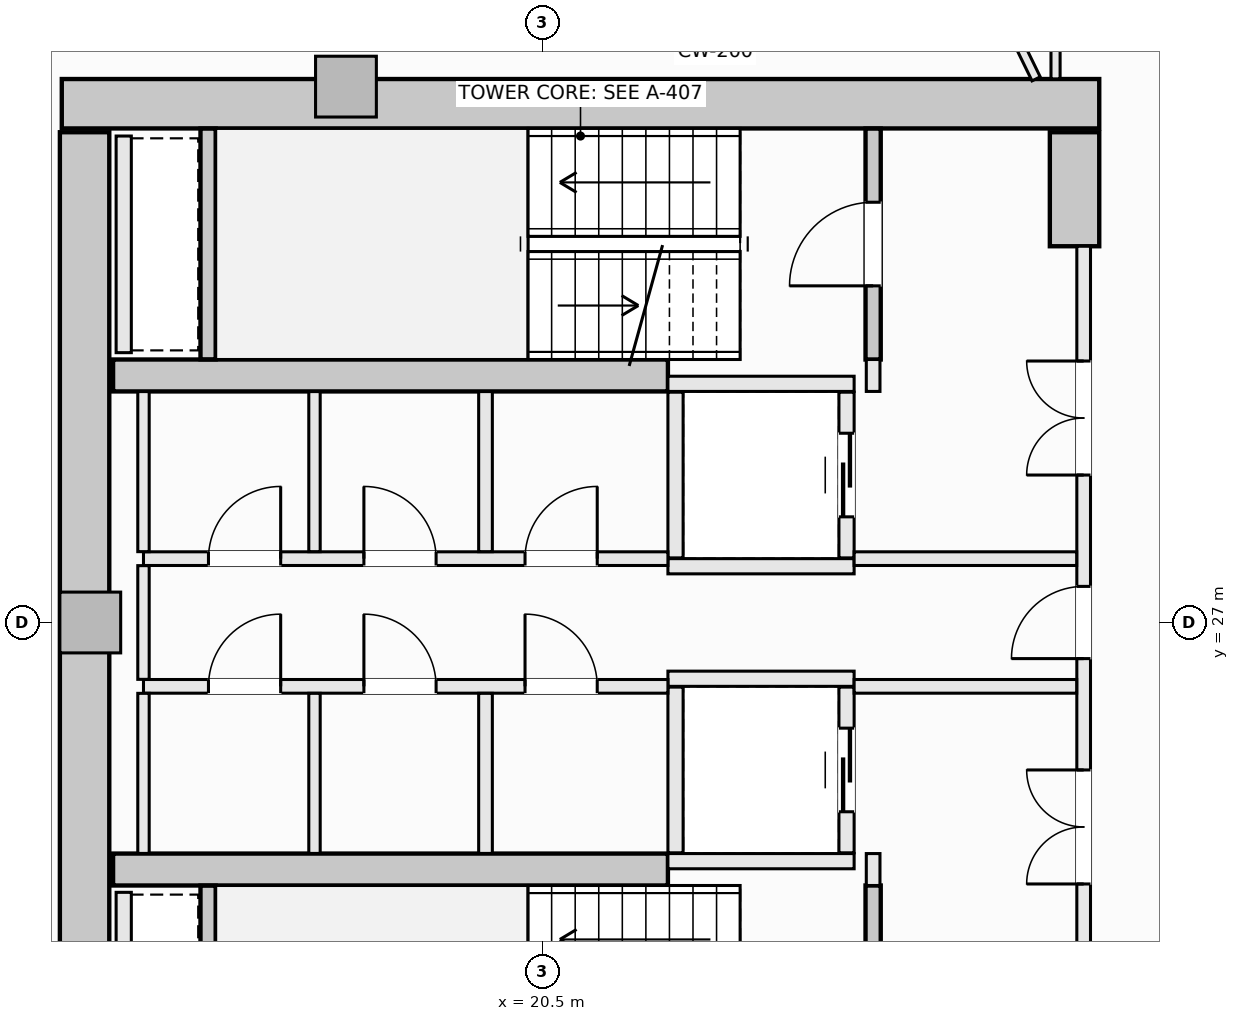
"""IFC4 building model, lengths in metres.
Left out: names, types, materials, properties, quantities, classifications, styles, units other than length and angle.
Written with IfcOpenShell. Run it as: python <this file> out.ifc"""

import sys

from ifc_helpers import new_model, si_unit, direction, frame, frame_2d, origin, origin_2d, place, context, subcontext, project, spatial, rectangle, extrude, element, fill, save


model = new_model("IFC4")
c1 = context("Model", 3, precision=1e-05, world=origin(), true_north=direction((0.0, 1.0)))
c2 = subcontext(c1, "Body", "Model", "MODEL_VIEW")
j1 = project(units=[si_unit("LENGTHUNIT", "METRE"), si_unit("PLANEANGLEUNIT", "RADIAN")], contexts=[c1])
p1 = place(None, origin())
s1 = spatial("IfcSite", under=j1, at=p1, CompositionType="ELEMENT")
p2 = place(p1, origin())
s2 = spatial("IfcBuilding", under=s1, at=p2, CompositionType="ELEMENT")
p3 = place(p2, frame((0.0, 0.0, 125.7)))
s3 = spatial("IfcBuildingStorey", under=s2, at=p3, CompositionType="ELEMENT", Elevation=125.7)
p4 = place(p3, frame((14.175, 33.825, -0.27), z_axis=(0.0, 0.0, 1.0), x_axis=(1.0, 0.0, 0.0)))
e1 = element("IfcWall", 1, at=p4, inside=s3, PredefinedType="SHEAR", context=c2, shape_type="SweptSolid", body=[
    extrude(rectangle(XDim=13.65, YDim=0.65, at=frame_2d((6.825, 0.0))), origin(), (0.0, 0.0, 1.0), 3.4),
])
p5 = place(p3, frame((14.475, 20.55, -0.27), z_axis=(0.0, 0.0, 1.0), x_axis=(0.0, 1.0, 0.0)))
e2 = element("IfcWall", 2, at=p5, inside=s3, PredefinedType="SHEAR", context=c2, shape_type="SweptSolid", body=[
    extrude(rectangle(XDim=12.9, YDim=0.65, at=frame_2d((6.45, 0.0))), origin(), (0.0, 0.0, 1.0), 3.4),
])
p6 = place(p3, frame((27.5, 31.95, -0.27), z_axis=(0.0, 0.0, 1.0), x_axis=(0.0, 1.0, 0.0)))
e3 = element("IfcWall", 3, at=p6, inside=s3, PredefinedType="SHEAR", context=c2, shape_type="SweptSolid", body=[
    extrude(rectangle(XDim=1.5, YDim=0.65, at=frame_2d((0.75, 0.0))), origin(), (0.0, 0.0, 1.0), 3.4),
])
for number, where, z_axis, x_axis in (
    (4, (14.85, 30.25, -0.27), (0.0, 0.0, 1.0), (1.0, 0.0, 0.0)),
    (5, (14.85, 23.75, -0.27), (0.0, 0.0, 1.0), (1.0, 0.0, 0.0)),
):
    element("IfcWall", number, at=place(p3, frame(where, z_axis=z_axis, x_axis=x_axis)), inside=s3, PredefinedType="SHEAR", context=c2, shape_type="SweptSolid", body=[
        extrude(rectangle(XDim=7.3, YDim=0.42, at=frame_2d((3.65, 0.0))), origin(), (0.0, 0.0, 1.0), 3.4),
    ])
for number, where, z_axis, x_axis in (
    (6, (17.914, 34.05, -0.27), (0.0, 0.0, 1.0), (1.0, 0.0, 0.0)),
    (7, (14.55, 27.0, -0.27), (0.0, 0.0, 1.0), (1.0, 0.0, 0.0)),
):
    element("IfcColumn", number, at=place(p3, frame(where, z_axis=z_axis, x_axis=x_axis)), inside=s3, PredefinedType="PILASTER", context=c2, shape_type="SweptSolid", body=[
        extrude(rectangle(XDim=0.8, YDim=0.8, at=origin_2d()), origin(), (0.0, 0.0, 1.0), 3.4),
    ])
p7 = place(p3, frame((24.85, 30.46, -0.27), z_axis=(0.0, 0.0, 1.0), x_axis=(0.0, 1.0, 0.0)))
e8 = element("IfcWall", 8, at=p7, inside=s3, PredefinedType="SHEAR", context=c2, shape_type="SweptSolid", body=[
    extrude(rectangle(XDim=3.038, YDim=0.2, at=frame_2d((1.519, 0.0))), origin(), (0.0, 0.0, 1.0), 3.4),
])
p8 = place(p7, frame((0.969, 0.0, 0.27)))
e9 = element("IfcOpeningElement", 9, at=p8, cuts=e8, PredefinedType="OPENING", context=c2, shape_type="SweptSolid", body=[
    extrude(rectangle(XDim=1.1, YDim=2.15, at=frame_2d((0.55, 1.075))), frame((0.0, 0.11, 0.0), z_axis=(0.0, -1.0, 0.0), x_axis=(1.0, 0.0, 0.0)), (0.0, 0.0, 1.0), 0.22),
])
p9 = place(p3, frame((16.1, 30.462, -0.27), z_axis=(0.0, 0.0, 1.0), x_axis=(0.0, 1.0, 0.0)))
e10 = element("IfcWall", 10, at=p9, inside=s3, PredefinedType="SHEAR", context=c2, shape_type="SweptSolid", body=[
    extrude(rectangle(XDim=3.036, YDim=0.2, at=frame_2d((1.518, 0.0))), origin(), (0.0, 0.0, 1.0), 3.4),
])
p10 = place(p3, frame((24.85, 20.502, -0.27), z_axis=(0.0, 0.0, 1.0), x_axis=(0.0, 1.0, 0.0)))
e11 = element("IfcWall", 11, at=p10, inside=s3, PredefinedType="SHEAR", context=c2, shape_type="SweptSolid", body=[
    extrude(rectangle(XDim=3.038, YDim=0.2, at=frame_2d((1.519, 0.0))), origin(), (0.0, 0.0, 1.0), 3.4),
])
p11 = place(p10, frame((0.969, 0.0, 0.27)))
e12 = element("IfcOpeningElement", 12, at=p11, cuts=e11, PredefinedType="OPENING", context=c2, shape_type="SweptSolid", body=[
    extrude(rectangle(XDim=1.1, YDim=2.15, at=frame_2d((0.55, 1.075))), frame((0.0, 0.11, 0.0), z_axis=(0.0, -1.0, 0.0), x_axis=(1.0, 0.0, 0.0)), (0.0, 0.0, 1.0), 0.22),
])
p12 = place(p3, frame((16.1, 20.502, -0.27), z_axis=(0.0, 0.0, 1.0), x_axis=(0.0, 1.0, 0.0)))
e13 = element("IfcWall", 13, at=p12, inside=s3, PredefinedType="SHEAR", context=c2, shape_type="SweptSolid", body=[
    extrude(rectangle(XDim=3.036, YDim=0.2, at=frame_2d((1.518, 0.0))), origin(), (0.0, 0.0, 1.0), 3.4),
])
for number, where, z_axis, x_axis in (
    (14, (22.15, 30.14, 0.0), (0.0, 0.0, 1.0), (1.0, 0.0, 0.0)),
    (15, (22.15, 27.74, 0.0), (0.0, 0.0, 1.0), (1.0, 0.0, 0.0)),
):
    element("IfcWall", number, at=place(p3, frame(where, z_axis=z_axis, x_axis=x_axis)), inside=s3, PredefinedType="SOLIDWALL", context=c2, shape_type="SweptSolid", body=[
        extrude(rectangle(XDim=2.45, YDim=0.2, at=frame_2d((1.225, 0.0))), origin(), (0.0, 0.0, 1.0), 3.13),
    ])
p13 = place(p3, frame((22.25, 27.85, 0.0), z_axis=(0.0, 0.0, 1.0), x_axis=(0.0, 1.0, 0.0)))
e16 = element("IfcWall", 16, at=p13, inside=s3, PredefinedType="SOLIDWALL", context=c2, shape_type="SweptSolid", body=[
    extrude(rectangle(XDim=2.18, YDim=0.2, at=frame_2d((1.09, 0.0))), origin(), (0.0, 0.0, 1.0), 3.13),
])
p14 = place(p3, frame((24.5, 27.85, 0.0), z_axis=(0.0, 0.0, 1.0), x_axis=(0.0, 1.0, 0.0)))
e17 = element("IfcWall", 17, at=p14, inside=s3, PredefinedType="SOLIDWALL", context=c2, shape_type="SweptSolid", body=[
    extrude(rectangle(XDim=2.18, YDim=0.2, at=frame_2d((1.09, 0.0))), origin(), (0.0, 0.0, 1.0), 3.13),
])
p15 = place(p14, frame((0.54, 0.0, 0.0)))
e18 = element("IfcOpeningElement", 18, at=p15, cuts=e17, PredefinedType="OPENING", context=c2, shape_type="SweptSolid", body=[
    extrude(rectangle(XDim=1.1, YDim=2.2, at=frame_2d((0.55, 1.1))), frame((0.0, 0.11, 0.0), z_axis=(0.0, -1.0, 0.0), x_axis=(1.0, 0.0, 0.0)), (0.0, 0.0, 1.0), 0.22),
])
for number, where, z_axis, x_axis in (
    (19, (22.15, 26.26, 0.0), (0.0, 0.0, 1.0), (1.0, 0.0, 0.0)),
    (20, (22.15, 23.86, 0.0), (0.0, 0.0, 1.0), (1.0, 0.0, 0.0)),
):
    element("IfcWall", number, at=place(p3, frame(where, z_axis=z_axis, x_axis=x_axis)), inside=s3, PredefinedType="SOLIDWALL", context=c2, shape_type="SweptSolid", body=[
        extrude(rectangle(XDim=2.45, YDim=0.2, at=frame_2d((1.225, 0.0))), origin(), (0.0, 0.0, 1.0), 3.13),
    ])
p16 = place(p3, frame((22.25, 23.97, 0.0), z_axis=(0.0, 0.0, 1.0), x_axis=(0.0, 1.0, 0.0)))
e21 = element("IfcWall", 21, at=p16, inside=s3, PredefinedType="SOLIDWALL", context=c2, shape_type="SweptSolid", body=[
    extrude(rectangle(XDim=2.18, YDim=0.2, at=frame_2d((1.09, 0.0))), origin(), (0.0, 0.0, 1.0), 3.13),
])
p17 = place(p3, frame((24.5, 23.97, 0.0), z_axis=(0.0, 0.0, 1.0), x_axis=(0.0, 1.0, 0.0)))
e22 = element("IfcWall", 22, at=p17, inside=s3, PredefinedType="SOLIDWALL", context=c2, shape_type="SweptSolid", body=[
    extrude(rectangle(XDim=2.18, YDim=0.2, at=frame_2d((1.09, 0.0))), origin(), (0.0, 0.0, 1.0), 3.13),
])
p18 = place(p17, frame((0.54, 0.0, 0.0)))
e23 = element("IfcOpeningElement", 23, at=p18, cuts=e22, PredefinedType="OPENING", context=c2, shape_type="SweptSolid", body=[
    extrude(rectangle(XDim=1.1, YDim=2.2, at=frame_2d((0.55, 1.1))), frame((0.0, 0.11, 0.0), z_axis=(0.0, -1.0, 0.0), x_axis=(1.0, 0.0, 0.0)), (0.0, 0.0, 1.0), 0.22),
])
for number, where, z_axis, x_axis in (
    (24, (14.99, 30.55, 0.0), (0.0, 0.0, 1.0), (0.0, 1.0, 0.0)),
    (25, (14.99, 20.6, 0.0), (0.0, 0.0, 1.0), (0.0, 1.0, 0.0)),
):
    element("IfcWall", number, at=place(p3, frame(where, z_axis=z_axis, x_axis=x_axis)), inside=s3, PredefinedType="SOLIDWALL", context=c2, shape_type="SweptSolid", body=[
        extrude(rectangle(XDim=2.85, YDim=0.2, at=frame_2d((1.425, 0.0))), origin(), (0.0, 0.0, 1.0), 3.13),
    ])
for number, where, z_axis, x_axis in (
    (26, (24.85, 23.54, 0.0), (0.0, 0.0, 1.0), (0.0, 1.0, 0.0)),
    (27, (24.85, 30.04, 0.0), (0.0, 0.0, 1.0), (0.0, 1.0, 0.0)),
):
    element("IfcWall", number, at=place(p3, frame(where, z_axis=z_axis, x_axis=x_axis)), inside=s3, PredefinedType="SOLIDWALL", context=c2, shape_type="SweptSolid", body=[
        extrude(rectangle(XDim=0.42, YDim=0.18, at=frame_2d((0.21, 0.0))), origin(), (0.0, 0.0, 1.0), 3.13),
    ])
p19 = place(p3, frame((27.62, 22.05, 0.0), z_axis=(0.0, 0.0, 1.0), x_axis=(0.0, 1.0, 0.0)))
e28 = element("IfcWall", 28, at=p19, inside=s3, PredefinedType="SOLIDWALL", context=c2, shape_type="SweptSolid", body=[
    extrude(rectangle(XDim=9.9, YDim=0.18, at=frame_2d((4.95, 0.0))), origin(), (0.0, 0.0, 1.0), 3.13),
])
p20 = place(p19, frame((4.475, 0.0, 0.0)))
e29 = element("IfcOpeningElement", 29, at=p20, cuts=e28, PredefinedType="OPENING", context=c2, shape_type="SweptSolid", body=[
    extrude(rectangle(XDim=0.95, YDim=2.1, at=frame_2d((0.475, 1.05))), frame((0.0, 0.1, 0.0), z_axis=(0.0, -1.0, 0.0), x_axis=(1.0, 0.0, 0.0)), (0.0, 0.0, 1.0), 0.2),
])
p21 = place(p19, frame((6.89, 0.0, 0.0)))
e30 = element("IfcOpeningElement", 30, at=p21, cuts=e28, PredefinedType="OPENING", context=c2, shape_type="SweptSolid", body=[
    extrude(rectangle(XDim=1.5, YDim=2.2, at=frame_2d((0.75, 1.1))), frame((0.0, 0.1, 0.0), z_axis=(0.0, -1.0, 0.0), x_axis=(1.0, 0.0, 0.0)), (0.0, 0.0, 1.0), 0.2),
])
p22 = place(p19, frame((1.51, 0.0, 0.0)))
e31 = element("IfcOpeningElement", 31, at=p22, cuts=e28, PredefinedType="OPENING", context=c2, shape_type="SweptSolid", body=[
    extrude(rectangle(XDim=1.5, YDim=2.2, at=frame_2d((0.75, 1.1))), frame((0.0, 0.1, 0.0), z_axis=(0.0, -1.0, 0.0), x_axis=(1.0, 0.0, 0.0)), (0.0, 0.0, 1.0), 0.2),
])
p23 = place(p3, frame((15.25, 27.84, 0.0), z_axis=(0.0, 0.0, 1.0), x_axis=(1.0, 0.0, 0.0)))
e32 = element("IfcWall", 32, at=p23, inside=s3, PredefinedType="SOLIDWALL", context=c2, shape_type="SweptSolid", body=[
    extrude(rectangle(XDim=6.9, YDim=0.18, at=frame_2d((3.45, 0.0))), origin(), (0.0, 0.0, 1.0), 3.13),
])
p24 = place(p23, frame((5.02, 0.0, 0.0)))
e33 = element("IfcOpeningElement", 33, at=p24, cuts=e32, PredefinedType="OPENING", context=c2, shape_type="SweptSolid", body=[
    extrude(rectangle(XDim=0.95, YDim=2.1, at=frame_2d((0.475, 1.05))), frame((0.0, 0.1, 0.0), z_axis=(0.0, -1.0, 0.0), x_axis=(1.0, 0.0, 0.0)), (0.0, 0.0, 1.0), 0.2),
])
p25 = place(p23, frame((0.855, 0.0, 0.0)))
e34 = element("IfcOpeningElement", 34, at=p25, cuts=e32, PredefinedType="OPENING", context=c2, shape_type="SweptSolid", body=[
    extrude(rectangle(XDim=0.95, YDim=2.1, at=frame_2d((0.475, 1.05))), frame((0.0, 0.1, 0.0), z_axis=(0.0, -1.0, 0.0), x_axis=(1.0, 0.0, 0.0)), (0.0, 0.0, 1.0), 0.2),
])
p26 = place(p23, frame((2.9, 0.0, 0.0)))
e35 = element("IfcOpeningElement", 35, at=p26, cuts=e32, PredefinedType="OPENING", context=c2, shape_type="SweptSolid", body=[
    extrude(rectangle(XDim=0.95, YDim=2.1, at=frame_2d((0.475, 1.05))), frame((0.0, 0.1, 0.0), z_axis=(0.0, -1.0, 0.0), x_axis=(1.0, 0.0, 0.0)), (0.0, 0.0, 1.0), 0.2),
])
p27 = place(p3, frame((24.6, 27.84, 0.0), z_axis=(0.0, 0.0, 1.0), x_axis=(1.0, 0.0, 0.0)))
e36 = element("IfcWall", 36, at=p27, inside=s3, PredefinedType="SOLIDWALL", context=c2, shape_type="SweptSolid", body=[
    extrude(rectangle(XDim=2.928, YDim=0.18, at=frame_2d((1.464, 0.0))), origin(), (0.0, 0.0, 1.0), 3.13),
])
p28 = place(p3, frame((15.25, 26.16, 0.0), z_axis=(0.0, 0.0, 1.0), x_axis=(1.0, 0.0, 0.0)))
e37 = element("IfcWall", 37, at=p28, inside=s3, PredefinedType="SOLIDWALL", context=c2, shape_type="SweptSolid", body=[
    extrude(rectangle(XDim=6.9, YDim=0.18, at=frame_2d((3.45, 0.0))), origin(), (0.0, 0.0, 1.0), 3.13),
])
p29 = place(p28, frame((5.02, 0.0, 0.0)))
e38 = element("IfcOpeningElement", 38, at=p29, cuts=e37, PredefinedType="OPENING", context=c2, shape_type="SweptSolid", body=[
    extrude(rectangle(XDim=0.95, YDim=2.1, at=frame_2d((0.475, 1.05))), frame((0.0, 0.1, 0.0), z_axis=(0.0, -1.0, 0.0), x_axis=(1.0, 0.0, 0.0)), (0.0, 0.0, 1.0), 0.2),
])
p30 = place(p28, frame((0.855, 0.0, 0.0)))
e39 = element("IfcOpeningElement", 39, at=p30, cuts=e37, PredefinedType="OPENING", context=c2, shape_type="SweptSolid", body=[
    extrude(rectangle(XDim=0.95, YDim=2.1, at=frame_2d((0.475, 1.05))), frame((0.0, 0.1, 0.0), z_axis=(0.0, -1.0, 0.0), x_axis=(1.0, 0.0, 0.0)), (0.0, 0.0, 1.0), 0.2),
])
p31 = place(p28, frame((2.9, 0.0, 0.0)))
e40 = element("IfcOpeningElement", 40, at=p31, cuts=e37, PredefinedType="OPENING", context=c2, shape_type="SweptSolid", body=[
    extrude(rectangle(XDim=0.95, YDim=2.1, at=frame_2d((0.475, 1.05))), frame((0.0, 0.1, 0.0), z_axis=(0.0, -1.0, 0.0), x_axis=(1.0, 0.0, 0.0)), (0.0, 0.0, 1.0), 0.2),
])
p32 = place(p3, frame((24.6, 26.16, 0.0), z_axis=(0.0, 0.0, 1.0), x_axis=(1.0, 0.0, 0.0)))
e41 = element("IfcWall", 41, at=p32, inside=s3, PredefinedType="SOLIDWALL", context=c2, shape_type="SweptSolid", body=[
    extrude(rectangle(XDim=2.928, YDim=0.18, at=frame_2d((1.464, 0.0))), origin(), (0.0, 0.0, 1.0), 3.13),
])
p33 = place(p3, frame((15.25, 23.962, 0.0), z_axis=(0.0, 0.0, 1.0), x_axis=(0.0, 1.0, 0.0)))
e42 = element("IfcWall", 42, at=p33, inside=s3, PredefinedType="PARTITIONING", context=c2, shape_type="SweptSolid", body=[
    extrude(rectangle(XDim=2.106, YDim=0.15, at=frame_2d((1.053, 0.0))), origin(), (0.0, 0.0, 1.0), 3.13),
])
p34 = place(p3, frame((15.25, 26.252, 0.0), z_axis=(0.0, 0.0, 1.0), x_axis=(0.0, 1.0, 0.0)))
e43 = element("IfcWall", 43, at=p34, inside=s3, PredefinedType="PARTITIONING", context=c2, shape_type="SweptSolid", body=[
    extrude(rectangle(XDim=1.496, YDim=0.15, at=frame_2d((0.748, 0.0))), origin(), (0.0, 0.0, 1.0), 3.13),
])
p35 = place(p3, frame((15.25, 27.932, 0.0), z_axis=(0.0, 0.0, 1.0), x_axis=(0.0, 1.0, 0.0)))
e44 = element("IfcWall", 44, at=p35, inside=s3, PredefinedType="PARTITIONING", context=c2, shape_type="SweptSolid", body=[
    extrude(rectangle(XDim=2.106, YDim=0.15, at=frame_2d((1.053, 0.0))), origin(), (0.0, 0.0, 1.0), 3.13),
])
for number, where, z_axis, x_axis in (
    (45, (19.75, 23.962, 0.0), (0.0, 0.0, 1.0), (0.0, 1.0, 0.0)),
    (46, (19.75, 27.932, 0.0), (0.0, 0.0, 1.0), (0.0, 1.0, 0.0)),
):
    element("IfcWall", number, at=place(p3, frame(where, z_axis=z_axis, x_axis=x_axis)), inside=s3, PredefinedType="SOLIDWALL", context=c2, shape_type="SweptSolid", body=[
        extrude(rectangle(XDim=2.106, YDim=0.18, at=frame_2d((1.053, 0.0))), origin(), (0.0, 0.0, 1.0), 3.13),
    ])
for number, where, z_axis, x_axis in (
    (47, (17.5, 23.962, 0.0), (0.0, 0.0, 1.0), (0.0, 1.0, 0.0)),
    (48, (17.5, 27.932, 0.0), (0.0, 0.0, 1.0), (0.0, 1.0, 0.0)),
):
    element("IfcWall", number, at=place(p3, frame(where, z_axis=z_axis, x_axis=x_axis)), inside=s3, PredefinedType="PARTITIONING", context=c2, shape_type="SweptSolid", body=[
        extrude(rectangle(XDim=2.106, YDim=0.15, at=frame_2d((1.053, 0.0))), origin(), (0.0, 0.0, 1.0), 3.13),
    ])
p36 = place(p3, frame((27.25, 34.152, 0.0), z_axis=(0.0, 0.0, 1.0), x_axis=(0.0, 1.0, 0.0)))
e49 = element("IfcWall", 49, at=p36, inside=s3, PredefinedType="PARTITIONING", context=c2, shape_type="SweptSolid", body=[
    extrude(rectangle(XDim=0.806, YDim=0.12, at=frame_2d((0.403, 0.0))), origin(), (0.0, 0.0, 1.0), 3.13),
])
p37 = place(p3, frame((26.602, 34.958, 0.0), z_axis=(0.0, 0.0, 1.0), x_axis=(0.43792991699, -0.899009114417, 0.0)))
e50 = element("IfcWall", 50, at=p37, inside=s3, PredefinedType="PARTITIONING", context=c2, shape_type="SweptSolid", body=[
    extrude(rectangle(XDim=0.896, YDim=0.12, at=frame_2d((0.448, 0.0))), origin(), (0.0, 0.0, 1.0), 3.13),
])
p38 = place(p8, origin())
e51 = element("IfcDoor", 51, at=p38, inside=s3, OperationType="SINGLE_SWING_LEFT", PredefinedType="DOOR", context=c2, shape_type="SweptSolid", body=[
    extrude(rectangle(XDim=1.1, YDim=2.15, at=frame_2d((0.55, 1.075))), frame((0.0, 0.025, 0.0), z_axis=(0.0, -1.0, 0.0), x_axis=(1.0, 0.0, 0.0)), (0.0, 0.0, 1.0), 0.05),
])
fill(e9, e51)
p39 = place(p15, origin())
e52 = element("IfcDoor", 52, at=p39, inside=s3, OperationType="SLIDING_TO_LEFT", PredefinedType="DOOR", context=c2, shape_type="SweptSolid", body=[
    extrude(rectangle(XDim=1.1, YDim=2.2, at=frame_2d((0.55, 1.1))), frame((0.0, 0.025, 0.0), z_axis=(0.0, -1.0, 0.0), x_axis=(1.0, 0.0, 0.0)), (0.0, 0.0, 1.0), 0.05),
])
fill(e18, e52)
p40 = place(p18, origin())
e53 = element("IfcDoor", 53, at=p40, inside=s3, OperationType="SLIDING_TO_LEFT", PredefinedType="DOOR", context=c2, shape_type="SweptSolid", body=[
    extrude(rectangle(XDim=1.1, YDim=2.2, at=frame_2d((0.55, 1.1))), frame((0.0, 0.025, 0.0), z_axis=(0.0, -1.0, 0.0), x_axis=(1.0, 0.0, 0.0)), (0.0, 0.0, 1.0), 0.05),
])
fill(e23, e53)
p41 = place(p20, origin())
e54 = element("IfcDoor", 54, at=p41, inside=s3, OperationType="SINGLE_SWING_LEFT", PredefinedType="DOOR", context=c2, shape_type="SweptSolid", body=[
    extrude(rectangle(XDim=0.95, YDim=2.1, at=frame_2d((0.475, 1.05))), frame((0.0, 0.025, 0.0), z_axis=(0.0, -1.0, 0.0), x_axis=(1.0, 0.0, 0.0)), (0.0, 0.0, 1.0), 0.05),
])
fill(e29, e54)
p42 = place(p21, origin())
e55 = element("IfcDoor", 55, at=p42, inside=s3, OperationType="DOUBLE_DOOR_SINGLE_SWING", PredefinedType="DOOR", context=c2, shape_type="SweptSolid", body=[
    extrude(rectangle(XDim=1.5, YDim=2.2, at=frame_2d((0.75, 1.1))), frame((0.0, 0.025, 0.0), z_axis=(0.0, -1.0, 0.0), x_axis=(1.0, 0.0, 0.0)), (0.0, 0.0, 1.0), 0.05),
])
fill(e30, e55)
p43 = place(p22, origin())
e56 = element("IfcDoor", 56, at=p43, inside=s3, OperationType="DOUBLE_DOOR_SINGLE_SWING", PredefinedType="DOOR", context=c2, shape_type="SweptSolid", body=[
    extrude(rectangle(XDim=1.5, YDim=2.2, at=frame_2d((0.75, 1.1))), frame((0.0, 0.025, 0.0), z_axis=(0.0, -1.0, 0.0), x_axis=(1.0, 0.0, 0.0)), (0.0, 0.0, 1.0), 0.05),
])
fill(e31, e56)
p44 = place(p24, origin())
e57 = element("IfcDoor", 57, at=p44, inside=s3, OperationType="SINGLE_SWING_RIGHT", PredefinedType="DOOR", context=c2, shape_type="SweptSolid", body=[
    extrude(rectangle(XDim=0.95, YDim=2.1, at=frame_2d((0.475, 1.05))), frame((0.0, 0.025, 0.0), z_axis=(0.0, -1.0, 0.0), x_axis=(1.0, 0.0, 0.0)), (0.0, 0.0, 1.0), 0.05),
])
fill(e33, e57)
p45 = place(p29, origin())
e58 = element("IfcDoor", 58, at=p45, inside=s3, OperationType="SINGLE_SWING_LEFT", PredefinedType="DOOR", context=c2, shape_type="SweptSolid", body=[
    extrude(rectangle(XDim=0.95, YDim=2.1, at=frame_2d((0.475, 1.05))), frame((0.0, 0.025, 0.0), z_axis=(0.0, -1.0, 0.0), x_axis=(1.0, 0.0, 0.0)), (0.0, 0.0, 1.0), 0.05),
])
fill(e38, e58)
p46 = place(p25, origin())
e59 = element("IfcDoor", 59, at=p46, inside=s3, OperationType="SINGLE_SWING_RIGHT", PredefinedType="DOOR", context=c2, shape_type="SweptSolid", body=[
    extrude(rectangle(XDim=0.95, YDim=2.1, at=frame_2d((0.475, 1.05))), frame((0.0, 0.025, 0.0), z_axis=(0.0, -1.0, 0.0), x_axis=(1.0, 0.0, 0.0)), (0.0, 0.0, 1.0), 0.05),
])
fill(e34, e59)
p47 = place(p26, origin())
e60 = element("IfcDoor", 60, at=p47, inside=s3, OperationType="SINGLE_SWING_LEFT", PredefinedType="DOOR", context=c2, shape_type="SweptSolid", body=[
    extrude(rectangle(XDim=0.95, YDim=2.1, at=frame_2d((0.475, 1.05))), frame((0.0, 0.025, 0.0), z_axis=(0.0, -1.0, 0.0), x_axis=(1.0, 0.0, 0.0)), (0.0, 0.0, 1.0), 0.05),
])
fill(e35, e60)
p48 = place(p30, origin())
e61 = element("IfcDoor", 61, at=p48, inside=s3, OperationType="SINGLE_SWING_RIGHT", PredefinedType="DOOR", context=c2, shape_type="SweptSolid", body=[
    extrude(rectangle(XDim=0.95, YDim=2.1, at=frame_2d((0.475, 1.05))), frame((0.0, 0.025, 0.0), z_axis=(0.0, -1.0, 0.0), x_axis=(1.0, 0.0, 0.0)), (0.0, 0.0, 1.0), 0.05),
])
fill(e39, e61)
p49 = place(p31, origin())
e62 = element("IfcDoor", 62, at=p49, inside=s3, OperationType="SINGLE_SWING_LEFT", PredefinedType="DOOR", context=c2, shape_type="SweptSolid", body=[
    extrude(rectangle(XDim=0.95, YDim=2.1, at=frame_2d((0.475, 1.05))), frame((0.0, 0.025, 0.0), z_axis=(0.0, -1.0, 0.0), x_axis=(1.0, 0.0, 0.0)), (0.0, 0.0, 1.0), 0.05),
])
fill(e40, e62)
save(model, sys.argv[1])
